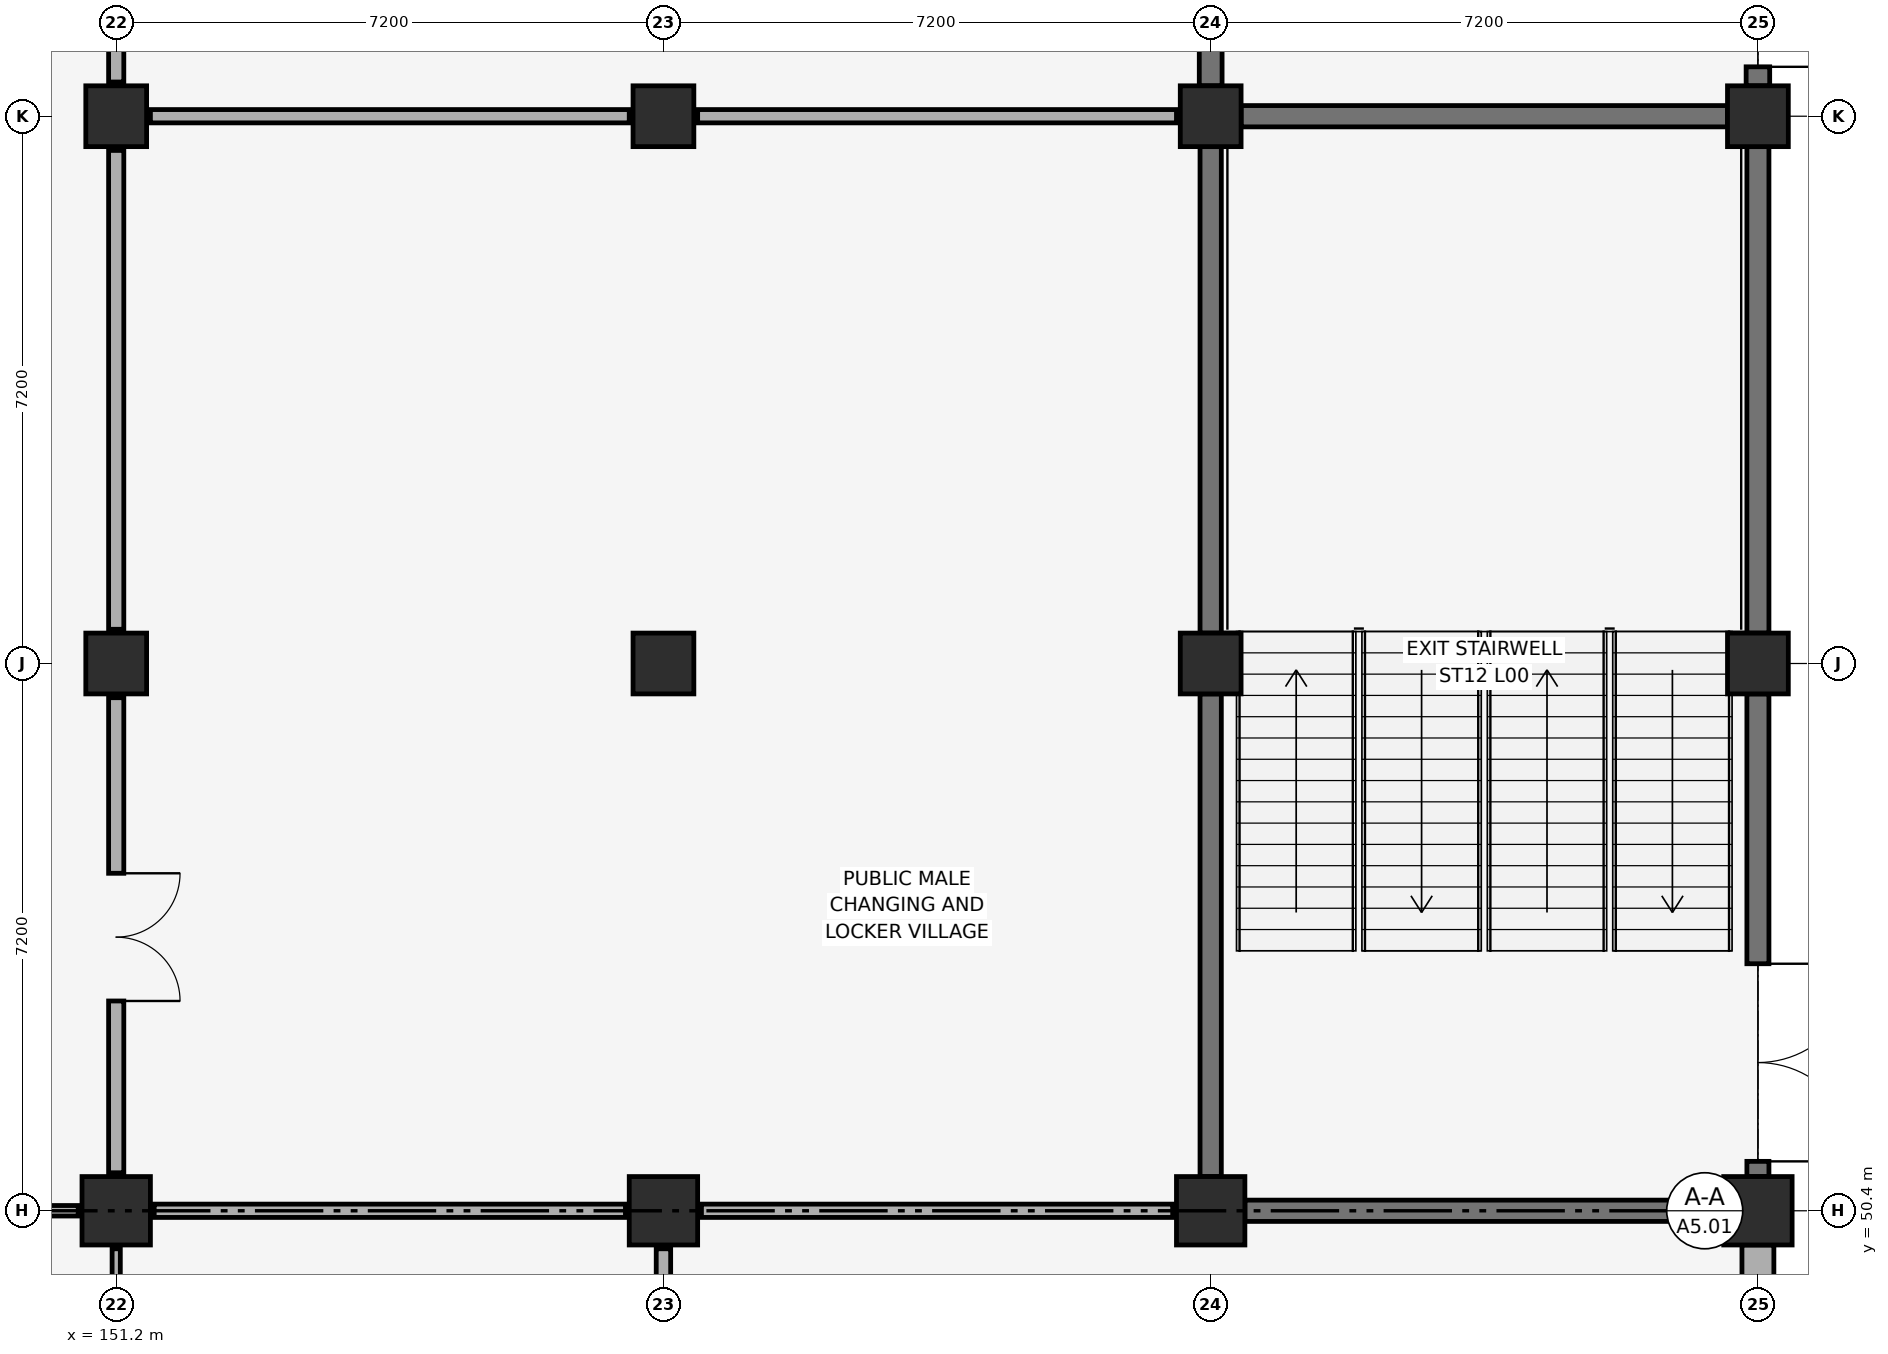
"""IFC4 building model, lengths in metres.
Left out: names, types, materials, properties, quantities, classifications, styles, units other than length and angle.
Written with IfcOpenShell. Run it as: python <this file> out.ifc"""

import sys

from ifc_helpers import new_model, si_unit, direction, frame, frame_2d, origin, origin_2d, place, context, subcontext, project, spatial, rectangle, extrude, element, fill, save


model = new_model("IFC4")
c1 = context("Model", 3, precision=1e-05, world=origin(), true_north=direction((0.0, 1.0)))
c2 = subcontext(c1, "Body", "Model", "MODEL_VIEW")
j1 = project(units=[si_unit("LENGTHUNIT", "METRE"), si_unit("PLANEANGLEUNIT", "RADIAN")], contexts=[c1])
p1 = place(None, origin())
s1 = spatial("IfcSite", under=j1, at=p1, CompositionType="ELEMENT")
p2 = place(p1, origin())
s2 = spatial("IfcBuilding", under=s1, at=p2, CompositionType="ELEMENT")
p3 = place(p2, origin())
s3 = spatial("IfcBuildingStorey", under=s2, at=p3, CompositionType="ELEMENT", Elevation=0.0)
p4 = place(p3, frame((151.2, 50.4, 0.0), z_axis=(0.0, 0.0, 1.0), x_axis=(1.0, 0.0, 0.0)))
e1 = element("IfcColumn", 1, at=p4, inside=s3, PredefinedType="COLUMN", context=c2, shape_type="SweptSolid", body=[
    extrude(rectangle(XDim=0.9, YDim=0.9, at=origin_2d()), origin(), (0.0, 0.0, 1.0), 5.4),
])
for number, where, z_axis, x_axis in (
    (2, (151.2, 57.6, 0.0), (0.0, 0.0, 1.0), (1.0, 0.0, 0.0)),
    (3, (151.2, 64.8, 0.0), (0.0, 0.0, 1.0), (1.0, 0.0, 0.0)),
):
    element("IfcColumn", number, at=place(p3, frame(where, z_axis=z_axis, x_axis=x_axis)), inside=s3, PredefinedType="COLUMN", context=c2, shape_type="SweptSolid", body=[
        extrude(rectangle(XDim=0.8, YDim=0.8, at=origin_2d()), origin(), (0.0, 0.0, 1.0), 5.4),
    ])
p5 = place(p3, frame((158.4, 50.4, 0.0), z_axis=(0.0, 0.0, 1.0), x_axis=(1.0, 0.0, 0.0)))
e4 = element("IfcColumn", 4, at=p5, inside=s3, PredefinedType="COLUMN", context=c2, shape_type="SweptSolid", body=[
    extrude(rectangle(XDim=0.9, YDim=0.9, at=origin_2d()), origin(), (0.0, 0.0, 1.0), 5.4),
])
for number, where, z_axis, x_axis in (
    (5, (158.4, 57.6, 0.0), (0.0, 0.0, 1.0), (1.0, 0.0, 0.0)),
    (6, (158.4, 64.8, 0.0), (0.0, 0.0, 1.0), (1.0, 0.0, 0.0)),
):
    element("IfcColumn", number, at=place(p3, frame(where, z_axis=z_axis, x_axis=x_axis)), inside=s3, PredefinedType="COLUMN", context=c2, shape_type="SweptSolid", body=[
        extrude(rectangle(XDim=0.8, YDim=0.8, at=origin_2d()), origin(), (0.0, 0.0, 1.0), 5.4),
    ])
p6 = place(p3, frame((165.6, 50.4, 0.0), z_axis=(0.0, 0.0, 1.0), x_axis=(1.0, 0.0, 0.0)))
e7 = element("IfcColumn", 7, at=p6, inside=s3, PredefinedType="COLUMN", context=c2, shape_type="SweptSolid", body=[
    extrude(rectangle(XDim=0.9, YDim=0.9, at=origin_2d()), origin(), (0.0, 0.0, 1.0), 5.4),
])
for number, where, z_axis, x_axis in (
    (8, (165.6, 57.6, 0.0), (0.0, 0.0, 1.0), (1.0, 0.0, 0.0)),
    (9, (165.6, 64.8, 0.0), (0.0, 0.0, 1.0), (1.0, 0.0, 0.0)),
):
    element("IfcColumn", number, at=place(p3, frame(where, z_axis=z_axis, x_axis=x_axis)), inside=s3, PredefinedType="COLUMN", context=c2, shape_type="SweptSolid", body=[
        extrude(rectangle(XDim=0.8, YDim=0.8, at=origin_2d()), origin(), (0.0, 0.0, 1.0), 5.4),
    ])
p7 = place(p3, frame((172.8, 50.4, 0.0), z_axis=(0.0, 0.0, 1.0), x_axis=(1.0, 0.0, 0.0)))
e10 = element("IfcColumn", 10, at=p7, inside=s3, PredefinedType="COLUMN", context=c2, shape_type="SweptSolid", body=[
    extrude(rectangle(XDim=0.9, YDim=0.9, at=origin_2d()), origin(), (0.0, 0.0, 1.0), 5.4),
])
for number, where, z_axis, x_axis in (
    (11, (172.8, 57.6, 0.0), (0.0, 0.0, 1.0), (1.0, 0.0, 0.0)),
    (12, (172.8, 64.8, 0.0), (0.0, 0.0, 1.0), (1.0, 0.0, 0.0)),
):
    element("IfcColumn", number, at=place(p3, frame(where, z_axis=z_axis, x_axis=x_axis)), inside=s3, PredefinedType="COLUMN", context=c2, shape_type="SweptSolid", body=[
        extrude(rectangle(XDim=0.8, YDim=0.8, at=origin_2d()), origin(), (0.0, 0.0, 1.0), 5.4),
    ])
p8 = place(p3, frame((172.8, 43.65, 0.0), z_axis=(0.0, 0.0, 1.0), x_axis=(0.0, 1.0, 0.0)))
e13 = element("IfcWall", 13, at=p8, inside=s3, PredefinedType="SOLIDWALL", context=c2, shape_type="SweptSolid", body=[
    extrude(rectangle(XDim=6.3, YDim=0.42, at=frame_2d((3.15, 0.0))), origin(), (0.0, 0.0, 1.0), 5.14),
])
p9 = place(p3, frame((166.05, 50.4, 0.0), z_axis=(0.0, 0.0, 1.0), x_axis=(1.0, 0.0, 0.0)))
e14 = element("IfcWall", 14, at=p9, inside=s3, PredefinedType="SHEAR", context=c2, shape_type="SweptSolid", body=[
    extrude(rectangle(XDim=6.3, YDim=0.28, at=frame_2d((3.15, 0.0))), origin(), (0.0, 0.0, 1.0), 5.14),
])
p10 = place(p3, frame((166.0, 64.8, 0.0), z_axis=(0.0, 0.0, 1.0), x_axis=(1.0, 0.0, 0.0)))
e15 = element("IfcWall", 15, at=p10, inside=s3, PredefinedType="SHEAR", context=c2, shape_type="SweptSolid", body=[
    extrude(rectangle(XDim=6.4, YDim=0.28, at=frame_2d((3.2, 0.0))), origin(), (0.0, 0.0, 1.0), 5.14),
])
p11 = place(p3, frame((165.6, 50.85, 0.0), z_axis=(0.0, 0.0, 1.0), x_axis=(0.0, 1.0, 0.0)))
e16 = element("IfcWall", 16, at=p11, inside=s3, PredefinedType="SHEAR", context=c2, shape_type="SweptSolid", body=[
    extrude(rectangle(XDim=6.35, YDim=0.28, at=frame_2d((3.175, 0.0))), origin(), (0.0, 0.0, 1.0), 5.14),
])
p12 = place(p3, frame((165.6, 58.0, 0.0), z_axis=(0.0, 0.0, 1.0), x_axis=(0.0, 1.0, 0.0)))
e17 = element("IfcWall", 17, at=p12, inside=s3, PredefinedType="SHEAR", context=c2, shape_type="SweptSolid", body=[
    extrude(rectangle(XDim=6.4, YDim=0.28, at=frame_2d((3.2, 0.0))), origin(), (0.0, 0.0, 1.0), 5.14),
])
p13 = place(p3, frame((172.8, 50.85, 0.0), z_axis=(0.0, 0.0, 1.0), x_axis=(0.0, 1.0, 0.0)))
e18 = element("IfcWall", 18, at=p13, inside=s3, PredefinedType="SHEAR", context=c2, shape_type="SweptSolid", body=[
    extrude(rectangle(XDim=6.35, YDim=0.29, at=frame_2d((3.175, 0.0))), origin(), (0.0, 0.0, 1.0), 5.14),
])
p14 = place(p13, frame((0.2, 0.0, 0.0)))
e19 = element("IfcOpeningElement", 19, at=p14, cuts=e18, PredefinedType="OPENING", context=c2, shape_type="SweptSolid", body=[
    extrude(rectangle(XDim=2.6, YDim=2.4, at=frame_2d((1.3, 1.2))), frame((0.0, 0.16, 0.0), z_axis=(0.0, -1.0, 0.0), x_axis=(1.0, 0.0, 0.0)), (0.0, 0.0, 1.0), 0.32),
])
p15 = place(p3, frame((172.8, 58.0, 0.0), z_axis=(0.0, 0.0, 1.0), x_axis=(0.0, 1.0, 0.0)))
e20 = element("IfcWall", 20, at=p15, inside=s3, PredefinedType="SHEAR", context=c2, shape_type="SweptSolid", body=[
    extrude(rectangle(XDim=6.4, YDim=0.29, at=frame_2d((3.2, 0.0))), origin(), (0.0, 0.0, 1.0), 5.14),
])
p16 = place(p3, frame((165.6, 65.2, 0.0), z_axis=(0.0, 0.0, 1.0), x_axis=(0.0, 1.0, 0.0)))
e21 = element("IfcWall", 21, at=p16, inside=s3, PredefinedType="SHEAR", context=c2, shape_type="SweptSolid", body=[
    extrude(rectangle(XDim=6.4, YDim=0.3, at=frame_2d((3.2, 0.0))), origin(), (0.0, 0.0, 1.0), 5.14),
])
p17 = place(p3, frame((172.8, 65.2, 0.0), z_axis=(0.0, 0.0, 1.0), x_axis=(0.0, 1.0, 0.0)))
e22 = element("IfcWall", 22, at=p17, inside=s3, PredefinedType="SHEAR", context=c2, shape_type="SweptSolid", body=[
    extrude(rectangle(XDim=6.4, YDim=0.31, at=frame_2d((3.2, 0.0))), origin(), (0.0, 0.0, 1.0), 5.14),
])
p18 = place(p17, frame((0.25, 0.0, 0.0)))
e23 = element("IfcOpeningElement", 23, at=p18, cuts=e22, PredefinedType="OPENING", context=c2, shape_type="SweptSolid", body=[
    extrude(rectangle(XDim=2.6, YDim=2.4, at=frame_2d((1.3, 1.2))), frame((0.0, 0.17, 0.0), z_axis=(0.0, -1.0, 0.0), x_axis=(1.0, 0.0, 0.0)), (0.0, 0.0, 1.0), 0.34),
])
p19 = place(p3, frame((151.7, 50.4, 0.0), z_axis=(0.0, 0.0, 1.0), x_axis=(1.0, 0.0, 0.0)))
e24 = element("IfcWall", 24, at=p19, inside=s3, PredefinedType="PARTITIONING", context=c2, shape_type="SweptSolid", body=[
    extrude(rectangle(XDim=6.2, YDim=0.175, at=frame_2d((3.1, 0.0))), origin(), (0.0, 0.0, 1.0), 4.64),
])
p20 = place(p3, frame((158.9, 50.4, 0.0), z_axis=(0.0, 0.0, 1.0), x_axis=(1.0, 0.0, 0.0)))
e25 = element("IfcWall", 25, at=p20, inside=s3, PredefinedType="PARTITIONING", context=c2, shape_type="SweptSolid", body=[
    extrude(rectangle(XDim=6.2, YDim=0.175, at=frame_2d((3.1, 0.0))), origin(), (0.0, 0.0, 1.0), 4.64),
])
p21 = place(p3, frame((151.65, 64.8, 0.0), z_axis=(0.0, 0.0, 1.0), x_axis=(1.0, 0.0, 0.0)))
e26 = element("IfcWall", 26, at=p21, inside=s3, PredefinedType="PARTITIONING", context=c2, shape_type="SweptSolid", body=[
    extrude(rectangle(XDim=6.3, YDim=0.175, at=frame_2d((3.15, 0.0))), origin(), (0.0, 0.0, 1.0), 4.29),
])
p22 = place(p3, frame((158.85, 64.8, 0.0), z_axis=(0.0, 0.0, 1.0), x_axis=(1.0, 0.0, 0.0)))
e27 = element("IfcWall", 27, at=p22, inside=s3, PredefinedType="PARTITIONING", context=c2, shape_type="SweptSolid", body=[
    extrude(rectangle(XDim=6.3, YDim=0.175, at=frame_2d((3.15, 0.0))), origin(), (0.0, 0.0, 1.0), 4.29),
])
p23 = place(p3, frame((151.2, 50.9, 0.0), z_axis=(0.0, 0.0, 1.0), x_axis=(0.0, 1.0, 0.0)))
e28 = element("IfcWall", 28, at=p23, inside=s3, PredefinedType="SOLIDWALL", context=c2, shape_type="SweptSolid", body=[
    extrude(rectangle(XDim=6.25, YDim=0.2, at=frame_2d((3.125, 0.0))), origin(), (0.0, 0.0, 1.0), 4.49),
])
p24 = place(p23, frame((2.26, 0.0, 0.0)))
e29 = element("IfcOpeningElement", 29, at=p24, cuts=e28, PredefinedType="OPENING", context=c2, shape_type="SweptSolid", body=[
    extrude(rectangle(XDim=1.68, YDim=2.25, at=frame_2d((0.84, 1.125))), frame((0.0, 0.115, 0.0), z_axis=(0.0, -1.0, 0.0), x_axis=(1.0, 0.0, 0.0)), (0.0, 0.0, 1.0), 0.23),
])
p25 = place(p3, frame((151.2, 58.05, 0.0), z_axis=(0.0, 0.0, 1.0), x_axis=(0.0, 1.0, 0.0)))
e30 = element("IfcWall", 30, at=p25, inside=s3, PredefinedType="SOLIDWALL", context=c2, shape_type="SweptSolid", body=[
    extrude(rectangle(XDim=6.3, YDim=0.2, at=frame_2d((3.15, 0.0))), origin(), (0.0, 0.0, 1.0), 4.49),
])
p26 = place(p3, frame((151.2, 65.25, 0.0), z_axis=(0.0, 0.0, 1.0), x_axis=(0.0, 1.0, 0.0)))
e31 = element("IfcWall", 31, at=p26, inside=s3, PredefinedType="SOLIDWALL", context=c2, shape_type="SweptSolid", body=[
    extrude(rectangle(XDim=6.3, YDim=0.2, at=frame_2d((3.15, 0.0))), origin(), (0.0, 0.0, 1.0), 4.49),
])
p27 = place(p26, frame((2.36, 0.0, 0.0)))
e32 = element("IfcOpeningElement", 32, at=p27, cuts=e31, PredefinedType="OPENING", context=c2, shape_type="SweptSolid", body=[
    extrude(rectangle(XDim=1.58, YDim=2.25, at=frame_2d((0.79, 1.125))), frame((0.0, 0.115, 0.0), z_axis=(0.0, -1.0, 0.0), x_axis=(1.0, 0.0, 0.0)), (0.0, 0.0, 1.0), 0.23),
])
p28 = place(p3, frame((144.5, 50.4, 0.0), z_axis=(0.0, 0.0, 1.0), x_axis=(1.0, 0.0, 0.0)))
e33 = element("IfcWall", 33, at=p28, inside=s3, PredefinedType="PARTITIONING", context=c2, shape_type="SweptSolid", body=[
    extrude(rectangle(XDim=6.2, YDim=0.138, at=frame_2d((3.1, 0.0))), origin(), (0.0, 0.0, 1.0), 4.64),
])
p29 = place(p3, frame((151.2, 43.7, 0.0), z_axis=(0.0, 0.0, 1.0), x_axis=(0.0, 1.0, 0.0)))
e34 = element("IfcWall", 34, at=p29, inside=s3, PredefinedType="PARTITIONING", context=c2, shape_type="SweptSolid", body=[
    extrude(rectangle(XDim=6.2, YDim=0.108, at=frame_2d((3.1, 0.0))), origin(), (0.0, 0.0, 1.0), 5.14),
])
p30 = place(p29, frame((1.7, 0.0, 0.95)))
e35 = element("IfcOpeningElement", 35, at=p30, cuts=e34, PredefinedType="OPENING", context=c2, shape_type="SweptSolid", body=[
    extrude(rectangle(XDim=2.8, YDim=1.5, at=frame_2d((1.4, 0.75))), frame((0.0, 0.069, 0.0), z_axis=(0.0, -1.0, 0.0), x_axis=(1.0, 0.0, 0.0)), (0.0, 0.0, 1.0), 0.138),
])
p31 = place(p3, frame((158.4, 43.7, 0.0), z_axis=(0.0, 0.0, 1.0), x_axis=(0.0, 1.0, 0.0)))
e36 = element("IfcWall", 36, at=p31, inside=s3, PredefinedType="SOLIDWALL", context=c2, shape_type="SweptSolid", body=[
    extrude(rectangle(XDim=6.2, YDim=0.19, at=frame_2d((3.1, 0.0))), origin(), (0.0, 0.0, 1.0), 5.14),
])
p32 = place(p31, frame((1.8, 0.0, 0.95)))
e37 = element("IfcOpeningElement", 37, at=p32, cuts=e36, PredefinedType="OPENING", context=c2, shape_type="SweptSolid", body=[
    extrude(rectangle(XDim=2.6, YDim=1.5, at=frame_2d((1.3, 0.75))), frame((0.0, 0.11, 0.0), z_axis=(0.0, -1.0, 0.0), x_axis=(1.0, 0.0, 0.0)), (0.0, 0.0, 1.0), 0.22),
])
p33 = place(p14, frame((2.6, 0.0, 0.0), z_axis=(0.0, 0.0, 1.0), x_axis=(-1.0, 0.0, 0.0)))
e38 = element("IfcDoor", 38, at=p33, inside=s3, OperationType="DOUBLE_SWING_LEFT", PredefinedType="DOOR", context=c2, shape_type="SweptSolid", body=[
    extrude(rectangle(XDim=2.6, YDim=2.4, at=frame_2d((1.3, 1.2))), frame((0.0, 0.025, 0.0), z_axis=(0.0, -1.0, 0.0), x_axis=(1.0, 0.0, 0.0)), (0.0, 0.0, 1.0), 0.05),
])
fill(e19, e38)
p34 = place(p18, frame((2.6, 0.0, 0.0), z_axis=(0.0, 0.0, 1.0), x_axis=(-1.0, 0.0, 0.0)))
e39 = element("IfcDoor", 39, at=p34, inside=s3, OperationType="DOUBLE_SWING_LEFT", PredefinedType="DOOR", context=c2, shape_type="SweptSolid", body=[
    extrude(rectangle(XDim=2.6, YDim=2.4, at=frame_2d((1.3, 1.2))), frame((0.0, 0.025, 0.0), z_axis=(0.0, -1.0, 0.0), x_axis=(1.0, 0.0, 0.0)), (0.0, 0.0, 1.0), 0.05),
])
fill(e23, e39)
p35 = place(p24, frame((1.68, 0.0, 0.0), z_axis=(0.0, 0.0, 1.0), x_axis=(-1.0, 0.0, 0.0)))
e40 = element("IfcDoor", 40, at=p35, inside=s3, OperationType="DOUBLE_SWING_LEFT", PredefinedType="DOOR", context=c2, shape_type="SweptSolid", body=[
    extrude(rectangle(XDim=1.68, YDim=2.25, at=frame_2d((0.84, 1.125))), frame((0.0, 0.025, 0.0), z_axis=(0.0, -1.0, 0.0), x_axis=(1.0, 0.0, 0.0)), (0.0, 0.0, 1.0), 0.05),
])
fill(e29, e40)
save(model, sys.argv[1])
